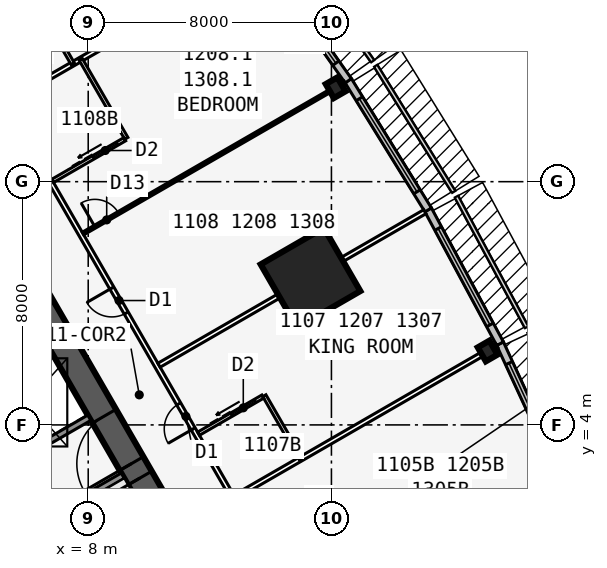
"""IFC4 building model, lengths in metres.
Left out: names, types, materials, properties, quantities, classifications, styles, units other than length and angle.
Written with IfcOpenShell. Run it as: python <this file> out.ifc"""

import sys

from ifc_helpers import new_model, si_unit, direction, frame, frame_2d, origin, origin_2d, place, context, subcontext, project, spatial, rectangle, i_section, extrude, element, fill, save


model = new_model("IFC4")
c1 = context("Model", 3, precision=1e-05, world=origin(), true_north=direction((0.0, 1.0)))
c2 = subcontext(c1, "Body", "Model", "MODEL_VIEW")
j1 = project(units=[si_unit("LENGTHUNIT", "METRE"), si_unit("PLANEANGLEUNIT", "RADIAN")], contexts=[c1])
p1 = place(None, origin())
s1 = spatial("IfcSite", under=j1, at=p1, CompositionType="ELEMENT")
p2 = place(p1, origin())
s2 = spatial("IfcBuilding", under=s1, at=p2, CompositionType="ELEMENT")
p3 = place(p2, frame((0.0, 0.0, 48.9)))
s3 = spatial("IfcBuildingStorey", under=s2, at=p3, CompositionType="ELEMENT", Elevation=48.9)
p4 = place(p3, frame((16.5, -9.526, 0.0), z_axis=(0.0, 0.0, 1.0), x_axis=(-0.499999749417, 0.866025548458, 0.0)))
e1 = element("IfcWall", 1, at=p4, inside=s3, PredefinedType="SHEAR", context=c2, shape_type="SweptSolid", body=[
    extrude(rectangle(XDim=33.0, YDim=0.9, at=frame_2d((16.5, 0.0))), origin(), (0.0, 0.0, 1.0), 3.4),
])
p5 = place(p4, frame((14.15, 0.0, 0.0)))
e2 = element("IfcOpeningElement", 2, at=p5, cuts=e1, PredefinedType="OPENING", context=c2, shape_type="SweptSolid", body=[
    extrude(rectangle(XDim=1.8, YDim=2.13, at=frame_2d((0.9, 1.065))), frame((0.0, 0.46, 0.0), z_axis=(0.0, -1.0, 0.0), x_axis=(1.0, 0.0, 0.0)), (0.0, 0.0, 1.0), 0.92),
])
p6 = place(p4, frame((12.6, 0.0, 0.0)))
e3 = element("IfcOpeningElement", 3, at=p6, cuts=e1, PredefinedType="OPENING", context=c2, shape_type="SweptSolid", body=[
    extrude(rectangle(XDim=1.0, YDim=2.13, at=frame_2d((0.5, 1.065))), frame((0.0, 0.46, 0.0), z_axis=(0.0, -1.0, 0.0), x_axis=(1.0, 0.0, 0.0)), (0.0, 0.0, 1.0), 0.92),
])
for number, where, z_axis, x_axis in (
    (4, (6.429, 0.767, 0.0), (0.0, 0.0, 1.0), (0.866, 0.5, 0.0)),
    (5, (5.329, 2.673, 0.0), (0.0, 0.0, 1.0), (0.866, 0.5, 0.0)),
):
    element("IfcWall", number, at=place(p3, frame(where, z_axis=z_axis, x_axis=x_axis)), inside=s3, PredefinedType="SOLIDWALL", context=c2, shape_type="SweptSolid", body=[
        extrude(rectangle(XDim=3.125, YDim=0.2, at=frame_2d((1.562, 0.0))), origin(), (0.0, 0.0, 1.0), 3.235),
    ])
for number, where, z_axis, x_axis in (
    (6, (21.137, 6.43, 0.0), (0.0, 0.0, 1.0), (0.866, 0.5, 0.0)),
    (7, (16.137, 15.09, 0.0), (0.0, 0.0, 1.0), (0.866, 0.5, 0.0)),
):
    element("IfcColumn", number, at=place(p3, frame(where, z_axis=z_axis, x_axis=x_axis)), inside=s3, PredefinedType="COLUMN", context=c2, shape_type="SweptSolid", body=[
        extrude(i_section(OverallWidth=0.442, OverallDepth=0.531, WebThickness=0.066, FlangeThickness=0.106, at=origin_2d()), origin(), (0.0, 0.0, 1.0), 3.4),
    ])
p7 = place(p3, frame((15.312, 8.84, 0.0), z_axis=(0.0, 0.0, 1.0), x_axis=(0.866025403784, 0.5, 0.0)))
e8 = element("IfcColumn", 8, at=p7, inside=s3, PredefinedType="COLUMN", context=c2, shape_type="SweptSolid", body=[
    extrude(rectangle(XDim=2.4, YDim=2.4, at=origin_2d()), origin(), (0.0, 0.0, 1.0), 3.4),
])
p8 = place(p3, frame((23.648, 2.119, 0.0), z_axis=(0.0, 0.0, 1.0), x_axis=(-0.419203100754, 0.907892482796, 0.0)))
e9 = element("IfcWall", 9, at=p8, inside=s3, PredefinedType="STANDARD", context=c2, shape_type="SweptSolid", body=[
    extrude(rectangle(XDim=5.021, YDim=0.25, at=frame_2d((2.51, 0.0))), origin(), (0.0, 0.0, 1.0), 3.235),
])
p9 = place(p8, frame((0.71, 0.0, 0.45)))
e10 = element("IfcOpeningElement", 10, at=p9, cuts=e9, PredefinedType="OPENING", context=c2, shape_type="SweptSolid", body=[
    extrude(rectangle(XDim=3.6, YDim=2.4, at=frame_2d((1.8, 1.2))), frame((0.0, 0.135, 0.0), z_axis=(0.0, -1.0, 0.0), x_axis=(1.0, 0.0, 0.0)), (0.0, 0.0, 1.0), 0.27),
])
p10 = place(p3, frame((21.547, 6.671, 0.0), z_axis=(0.0, 0.0, 1.0), x_axis=(-0.473412820489, 0.880840678782, 0.0)))
e11 = element("IfcWall", 11, at=p10, inside=s3, PredefinedType="STANDARD", context=c2, shape_type="SweptSolid", body=[
    extrude(rectangle(XDim=5.002, YDim=0.25, at=frame_2d((2.501, 0.0))), origin(), (0.0, 0.0, 1.0), 3.235),
])
p11 = place(p10, frame((0.701, 0.0, 0.45)))
e12 = element("IfcOpeningElement", 12, at=p11, cuts=e11, PredefinedType="OPENING", context=c2, shape_type="SweptSolid", body=[
    extrude(rectangle(XDim=3.6, YDim=2.4, at=frame_2d((1.8, 1.2))), frame((0.0, 0.135, 0.0), z_axis=(0.0, -1.0, 0.0), x_axis=(1.0, 0.0, 0.0)), (0.0, 0.0, 1.0), 0.27),
])
p12 = place(p3, frame((19.182, 11.071, 0.0), z_axis=(0.0, 0.0, 1.0), x_axis=(-0.526132807704, 0.850402415717, 0.0)))
e13 = element("IfcWall", 13, at=p12, inside=s3, PredefinedType="STANDARD", context=c2, shape_type="SweptSolid", body=[
    extrude(rectangle(XDim=5.002, YDim=0.25, at=frame_2d((2.501, 0.0))), origin(), (0.0, 0.0, 1.0), 3.235),
])
p13 = place(p12, frame((0.701, 0.0, 0.45)))
e14 = element("IfcOpeningElement", 14, at=p13, cuts=e13, PredefinedType="OPENING", context=c2, shape_type="SweptSolid", body=[
    extrude(rectangle(XDim=3.6, YDim=2.4, at=frame_2d((1.8, 1.2))), frame((0.0, 0.135, 0.0), z_axis=(0.0, -1.0, 0.0), x_axis=(1.0, 0.0, 0.0)), (0.0, 0.0, 1.0), 0.27),
])
p14 = place(p3, frame((16.555, 15.318, 0.0), z_axis=(0.0, 0.0, 1.0), x_axis=(-0.5766431066, 0.81699616132, 0.0)))
e15 = element("IfcWall", 15, at=p14, inside=s3, PredefinedType="STANDARD", context=c2, shape_type="SweptSolid", body=[
    extrude(rectangle(XDim=5.021, YDim=0.25, at=frame_2d((2.51, 0.0))), origin(), (0.0, 0.0, 1.0), 3.235),
])
p15 = place(p14, frame((0.71, 0.0, 0.45)))
e16 = element("IfcOpeningElement", 16, at=p15, cuts=e15, PredefinedType="OPENING", context=c2, shape_type="SweptSolid", body=[
    extrude(rectangle(XDim=3.6, YDim=2.4, at=frame_2d((1.8, 1.2))), frame((0.0, 0.135, 0.0), z_axis=(0.0, -1.0, 0.0), x_axis=(1.0, 0.0, 0.0)), (0.0, 0.0, 1.0), 0.27),
])
p16 = place(p3, frame((20.027, -10.985, 0.0), z_axis=(0.0, 0.0, 1.0), x_axis=(-0.500001677587, 0.866024435227, 0.0)))
e17 = element("IfcWall", 17, at=p16, inside=s3, PredefinedType="PARTITIONING", context=c2, shape_type="SweptSolid", body=[
    extrude(rectangle(XDim=39.054, YDim=0.15, at=frame_2d((19.527, 0.0))), origin(), (0.0, 0.0, 1.0), 3.235),
])
p17 = place(p16, frame((1.558, 0.0, 0.0)))
e18 = element("IfcOpeningElement", 18, at=p17, cuts=e17, PredefinedType="OPENING", context=c2, shape_type="SweptSolid", body=[
    extrude(rectangle(XDim=0.95, YDim=2.13, at=frame_2d((0.475, 1.065))), frame((0.0, 0.085, 0.0), z_axis=(0.0, -1.0, 0.0), x_axis=(1.0, 0.0, 0.0)), (0.0, 0.0, 1.0), 0.17),
])
p18 = place(p16, frame((12.152, 0.0, 0.0)))
e19 = element("IfcOpeningElement", 19, at=p18, cuts=e17, PredefinedType="OPENING", context=c2, shape_type="SweptSolid", body=[
    extrude(rectangle(XDim=0.95, YDim=2.13, at=frame_2d((0.475, 1.065))), frame((0.0, 0.085, 0.0), z_axis=(0.0, -1.0, 0.0), x_axis=(1.0, 0.0, 0.0)), (0.0, 0.0, 1.0), 0.17),
])
p19 = place(p16, frame((17.152, 0.0, 0.0)))
e20 = element("IfcOpeningElement", 20, at=p19, cuts=e17, PredefinedType="OPENING", context=c2, shape_type="SweptSolid", body=[
    extrude(rectangle(XDim=0.95, YDim=2.13, at=frame_2d((0.475, 1.065))), frame((0.0, 0.085, 0.0), z_axis=(0.0, -1.0, 0.0), x_axis=(1.0, 0.0, 0.0)), (0.0, 0.0, 1.0), 0.17),
])
p20 = place(p16, frame((21.552, 0.0, 0.0)))
e21 = element("IfcOpeningElement", 21, at=p20, cuts=e17, PredefinedType="OPENING", context=c2, shape_type="SweptSolid", body=[
    extrude(rectangle(XDim=0.95, YDim=2.13, at=frame_2d((0.475, 1.065))), frame((0.0, 0.085, 0.0), z_axis=(0.0, -1.0, 0.0), x_axis=(1.0, 0.0, 0.0)), (0.0, 0.0, 1.0), 0.17),
])
p21 = place(p16, frame((32.152, 0.0, 0.0)))
e22 = element("IfcOpeningElement", 22, at=p21, cuts=e17, PredefinedType="OPENING", context=c2, shape_type="SweptSolid", body=[
    extrude(rectangle(XDim=0.95, YDim=2.13, at=frame_2d((0.475, 1.065))), frame((0.0, 0.085, 0.0), z_axis=(0.0, -1.0, 0.0), x_axis=(1.0, 0.0, 0.0)), (0.0, 0.0, 1.0), 0.17),
])
p22 = place(p16, frame((37.752, 0.0, 0.0)))
e23 = element("IfcOpeningElement", 23, at=p22, cuts=e17, PredefinedType="OPENING", context=c2, shape_type="SweptSolid", body=[
    extrude(rectangle(XDim=0.95, YDim=2.13, at=frame_2d((0.475, 1.065))), frame((0.0, 0.085, 0.0), z_axis=(0.0, -1.0, 0.0), x_axis=(1.0, 0.0, 0.0)), (0.0, 0.0, 1.0), 0.17),
])
p23 = place(p3, frame((15.329, -2.697, 0.0), z_axis=(0.0, 0.0, 1.0), x_axis=(0.866018409083, 0.500012114982, 0.0)))
e24 = element("IfcWall", 24, at=p23, inside=s3, PredefinedType="PARTITIONING", context=c2, shape_type="SweptSolid", body=[
    extrude(rectangle(XDim=9.485, YDim=0.15, at=frame_2d((4.742, 0.0))), origin(), (0.0, 0.0, 1.0), 2.389),
])
p24 = place(p3, frame((12.829, 1.633, 0.0), z_axis=(0.0, 0.0, 1.0), x_axis=(0.866026934769, 0.499997348248, 0.0)))
e25 = element("IfcWall", 25, at=p24, inside=s3, PredefinedType="PARTITIONING", context=c2, shape_type="SweptSolid", body=[
    extrude(rectangle(XDim=9.943, YDim=0.15, at=frame_2d((4.971, 0.0))), origin(), (0.0, 0.0, 1.0), 2.389),
])
p25 = place(p3, frame((10.329, 5.963, 0.0), z_axis=(0.0, 0.0, 1.0), x_axis=(0.866021688545, 0.500006434927, 0.0)))
e26 = element("IfcWall", 26, at=p25, inside=s3, PredefinedType="PARTITIONING", context=c2, shape_type="SweptSolid", body=[
    extrude(rectangle(XDim=10.096, YDim=0.15, at=frame_2d((5.048, 0.0))), origin(), (0.0, 0.0, 1.0), 2.389),
])
p26 = place(p3, frame((7.829, 10.293, 0.0), z_axis=(0.0, 0.0, 1.0), x_axis=(0.866016302457, 0.50001576363, 0.0)))
e27 = element("IfcWall", 27, at=p26, inside=s3, PredefinedType="PARTITIONING", context=c2, shape_type="SweptSolid", body=[
    extrude(rectangle(XDim=9.943, YDim=0.1, at=frame_2d((4.972, 0.0))), origin(), (0.0, 0.0, 1.0), 2.389),
])
p27 = place(p26, frame((0.45, 0.0, 0.0)))
e28 = element("IfcOpeningElement", 28, at=p27, cuts=e27, PredefinedType="OPENING", context=c2, shape_type="SweptSolid", body=[
    extrude(rectangle(XDim=0.9, YDim=2.13, at=frame_2d((0.45, 1.065))), frame((0.0, 0.06, 0.0), z_axis=(0.0, -1.0, 0.0), x_axis=(1.0, 0.0, 0.0)), (0.0, 0.0, 1.0), 0.12),
])
p28 = place(p3, frame((5.329, 14.623, 0.0), z_axis=(0.0, 0.0, 1.0), x_axis=(0.866018409083, 0.500012114982, 0.0)))
e29 = element("IfcWall", 29, at=p28, inside=s3, PredefinedType="PARTITIONING", context=c2, shape_type="SweptSolid", body=[
    extrude(rectangle(XDim=9.485, YDim=0.15, at=frame_2d((4.742, 0.0))), origin(), (0.0, 0.0, 1.0), 2.389),
])
p29 = place(p3, frame((14.993, 2.883, 0.0), z_axis=(0.0, 0.0, 1.0), x_axis=(-0.500001309137, 0.866024647952, 0.0)))
e30 = element("IfcWall", 30, at=p29, inside=s3, PredefinedType="PLUMBINGWALL", context=c2, shape_type="SweptSolid", body=[
    extrude(rectangle(XDim=2.4, YDim=0.12, at=frame_2d((1.2, 0.0))), origin(), (0.0, 0.0, 1.0), 3.235),
])
p30 = place(p3, frame((11.628, 3.711, 0.0), z_axis=(0.0, 0.0, 1.0), x_axis=(0.866048967903, 0.499959183527, 0.0)))
e31 = element("IfcWall", 31, at=p30, inside=s3, PredefinedType="PLUMBINGWALL", context=c2, shape_type="SweptSolid", body=[
    extrude(rectangle(XDim=2.44, YDim=0.12, at=frame_2d((1.22, 0.0))), origin(), (0.0, 0.0, 1.0), 3.235),
])
p31 = place(p30, frame((1.25, 0.0, 0.0)))
e32 = element("IfcOpeningElement", 32, at=p31, cuts=e31, PredefinedType="OPENING", context=c2, shape_type="SweptSolid", body=[
    extrude(rectangle(XDim=0.9, YDim=2.13, at=frame_2d((0.45, 1.065))), frame((0.0, 0.07, 0.0), z_axis=(0.0, -1.0, 0.0), x_axis=(1.0, 0.0, 0.0)), (0.0, 0.0, 1.0), 0.14),
])
p32 = place(p3, frame((9.253, 13.425, 0.0), z_axis=(0.0, 0.0, 1.0), x_axis=(-0.499990139034, 0.866031096941, 0.0)))
e33 = element("IfcWall", 33, at=p32, inside=s3, PredefinedType="PLUMBINGWALL", context=c2, shape_type="SweptSolid", body=[
    extrude(rectangle(XDim=3.0, YDim=0.12, at=frame_2d((1.5, 0.0))), origin(), (0.0, 0.0, 1.0), 3.235),
])
p33 = place(p3, frame((6.829, 12.025, 0.0), z_axis=(0.0, 0.0, 1.0), x_axis=(0.866035715982, 0.499982138324, 0.0)))
e34 = element("IfcWall", 34, at=p33, inside=s3, PredefinedType="PLUMBINGWALL", context=c2, shape_type="SweptSolid", body=[
    extrude(rectangle(XDim=2.74, YDim=0.12, at=frame_2d((1.37, 0.0))), origin(), (0.0, 0.0, 1.0), 3.235),
])
p34 = place(p33, frame((1.55, 0.0, 0.0)))
e35 = element("IfcOpeningElement", 35, at=p34, cuts=e34, PredefinedType="OPENING", context=c2, shape_type="SweptSolid", body=[
    extrude(rectangle(XDim=0.9, YDim=2.13, at=frame_2d((0.45, 1.065))), frame((0.0, 0.07, 0.0), z_axis=(0.0, -1.0, 0.0), x_axis=(1.0, 0.0, 0.0)), (0.0, 0.0, 1.0), 0.14),
])
p35 = place(p3, frame((7.493, 15.873, 0.0), z_axis=(0.0, 0.0, 1.0), x_axis=(-0.499957262057, 0.866050077142, 0.0)))
e36 = element("IfcWall", 36, at=p35, inside=s3, PredefinedType="PLUMBINGWALL", context=c2, shape_type="SweptSolid", body=[
    extrude(rectangle(XDim=2.4, YDim=0.12, at=frame_2d((1.2, 0.0))), origin(), (0.0, 0.0, 1.0), 3.235),
])
p36 = place(p9, origin())
e37 = element("IfcWindow", 37, at=p36, inside=s3, PartitioningType="SINGLE_PANEL", PredefinedType="WINDOW", context=c2, shape_type="SweptSolid", body=[
    extrude(rectangle(XDim=3.6, YDim=2.4, at=frame_2d((1.8, 1.2))), frame((0.0, 0.03, 0.0), z_axis=(0.0, -1.0, 0.0), x_axis=(1.0, 0.0, 0.0)), (0.0, 0.0, 1.0), 0.06),
])
fill(e10, e37)
p37 = place(p11, origin())
e38 = element("IfcWindow", 38, at=p37, inside=s3, PartitioningType="SINGLE_PANEL", PredefinedType="WINDOW", context=c2, shape_type="SweptSolid", body=[
    extrude(rectangle(XDim=3.6, YDim=2.4, at=frame_2d((1.8, 1.2))), frame((0.0, 0.03, 0.0), z_axis=(0.0, -1.0, 0.0), x_axis=(1.0, 0.0, 0.0)), (0.0, 0.0, 1.0), 0.06),
])
fill(e12, e38)
p38 = place(p13, origin())
e39 = element("IfcWindow", 39, at=p38, inside=s3, PartitioningType="SINGLE_PANEL", PredefinedType="WINDOW", context=c2, shape_type="SweptSolid", body=[
    extrude(rectangle(XDim=3.6, YDim=2.4, at=frame_2d((1.8, 1.2))), frame((0.0, 0.03, 0.0), z_axis=(0.0, -1.0, 0.0), x_axis=(1.0, 0.0, 0.0)), (0.0, 0.0, 1.0), 0.06),
])
fill(e14, e39)
p39 = place(p15, origin())
e40 = element("IfcWindow", 40, at=p39, inside=s3, PartitioningType="SINGLE_PANEL", PredefinedType="WINDOW", context=c2, shape_type="SweptSolid", body=[
    extrude(rectangle(XDim=3.6, YDim=2.4, at=frame_2d((1.8, 1.2))), frame((0.0, 0.03, 0.0), z_axis=(0.0, -1.0, 0.0), x_axis=(1.0, 0.0, 0.0)), (0.0, 0.0, 1.0), 0.06),
])
fill(e16, e40)
p40 = place(p27, origin())
e41 = element("IfcDoor", 41, at=p40, inside=s3, OperationType="SINGLE_SWING_LEFT", PredefinedType="DOOR", context=c2, shape_type="SweptSolid", body=[
    extrude(rectangle(XDim=0.9, YDim=2.13, at=frame_2d((0.45, 1.065))), frame((0.0, 0.025, 0.0), z_axis=(0.0, -1.0, 0.0), x_axis=(1.0, 0.0, 0.0)), (0.0, 0.0, 1.0), 0.05),
])
fill(e28, e41)
p41 = place(p31, origin())
e42 = element("IfcDoor", 42, at=p41, inside=s3, OperationType="SLIDING_TO_LEFT", PredefinedType="DOOR", context=c2, shape_type="SweptSolid", body=[
    extrude(rectangle(XDim=0.9, YDim=2.13, at=frame_2d((0.45, 1.065))), frame((0.0, 0.025, 0.0), z_axis=(0.0, -1.0, 0.0), x_axis=(1.0, 0.0, 0.0)), (0.0, 0.0, 1.0), 0.05),
])
fill(e32, e42)
p42 = place(p19, origin())
e43 = element("IfcDoor", 43, at=p42, inside=s3, OperationType="SINGLE_SWING_LEFT", PredefinedType="DOOR", context=c2, shape_type="SweptSolid", body=[
    extrude(rectangle(XDim=0.95, YDim=2.13, at=frame_2d((0.475, 1.065))), frame((0.0, 0.025, 0.0), z_axis=(0.0, -1.0, 0.0), x_axis=(1.0, 0.0, 0.0)), (0.0, 0.0, 1.0), 0.05),
])
fill(e20, e43)
p43 = place(p20, origin())
e44 = element("IfcDoor", 44, at=p43, inside=s3, OperationType="SINGLE_SWING_RIGHT", PredefinedType="DOOR", context=c2, shape_type="SweptSolid", body=[
    extrude(rectangle(XDim=0.95, YDim=2.13, at=frame_2d((0.475, 1.065))), frame((0.0, 0.025, 0.0), z_axis=(0.0, -1.0, 0.0), x_axis=(1.0, 0.0, 0.0)), (0.0, 0.0, 1.0), 0.05),
])
fill(e21, e44)
p44 = place(p34, origin())
e45 = element("IfcDoor", 45, at=p44, inside=s3, OperationType="SLIDING_TO_LEFT", PredefinedType="DOOR", context=c2, shape_type="SweptSolid", body=[
    extrude(rectangle(XDim=0.9, YDim=2.13, at=frame_2d((0.45, 1.065))), frame((0.0, 0.025, 0.0), z_axis=(0.0, -1.0, 0.0), x_axis=(1.0, 0.0, 0.0)), (0.0, 0.0, 1.0), 0.05),
])
fill(e35, e45)
p45 = place(p5, origin())
e46 = element("IfcDoor", 46, at=p45, inside=s3, OperationType="DOUBLE_DOOR_SINGLE_SWING", PredefinedType="DOOR", context=c2, shape_type="SweptSolid", body=[
    extrude(rectangle(XDim=1.8, YDim=2.13, at=frame_2d((0.9, 1.065))), frame((0.0, 0.025, 0.0), z_axis=(0.0, -1.0, 0.0), x_axis=(1.0, 0.0, 0.0)), (0.0, 0.0, 1.0), 0.05),
])
fill(e2, e46)
p46 = place(p6, origin())
e47 = element("IfcDoor", 47, at=p46, inside=s3, OperationType="SINGLE_SWING_RIGHT", PredefinedType="DOOR", context=c2, shape_type="SweptSolid", body=[
    extrude(rectangle(XDim=1.0, YDim=2.13, at=frame_2d((0.5, 1.065))), frame((0.0, 0.025, 0.0), z_axis=(0.0, -1.0, 0.0), x_axis=(1.0, 0.0, 0.0)), (0.0, 0.0, 1.0), 0.05),
])
fill(e3, e47)
save(model, sys.argv[1])
